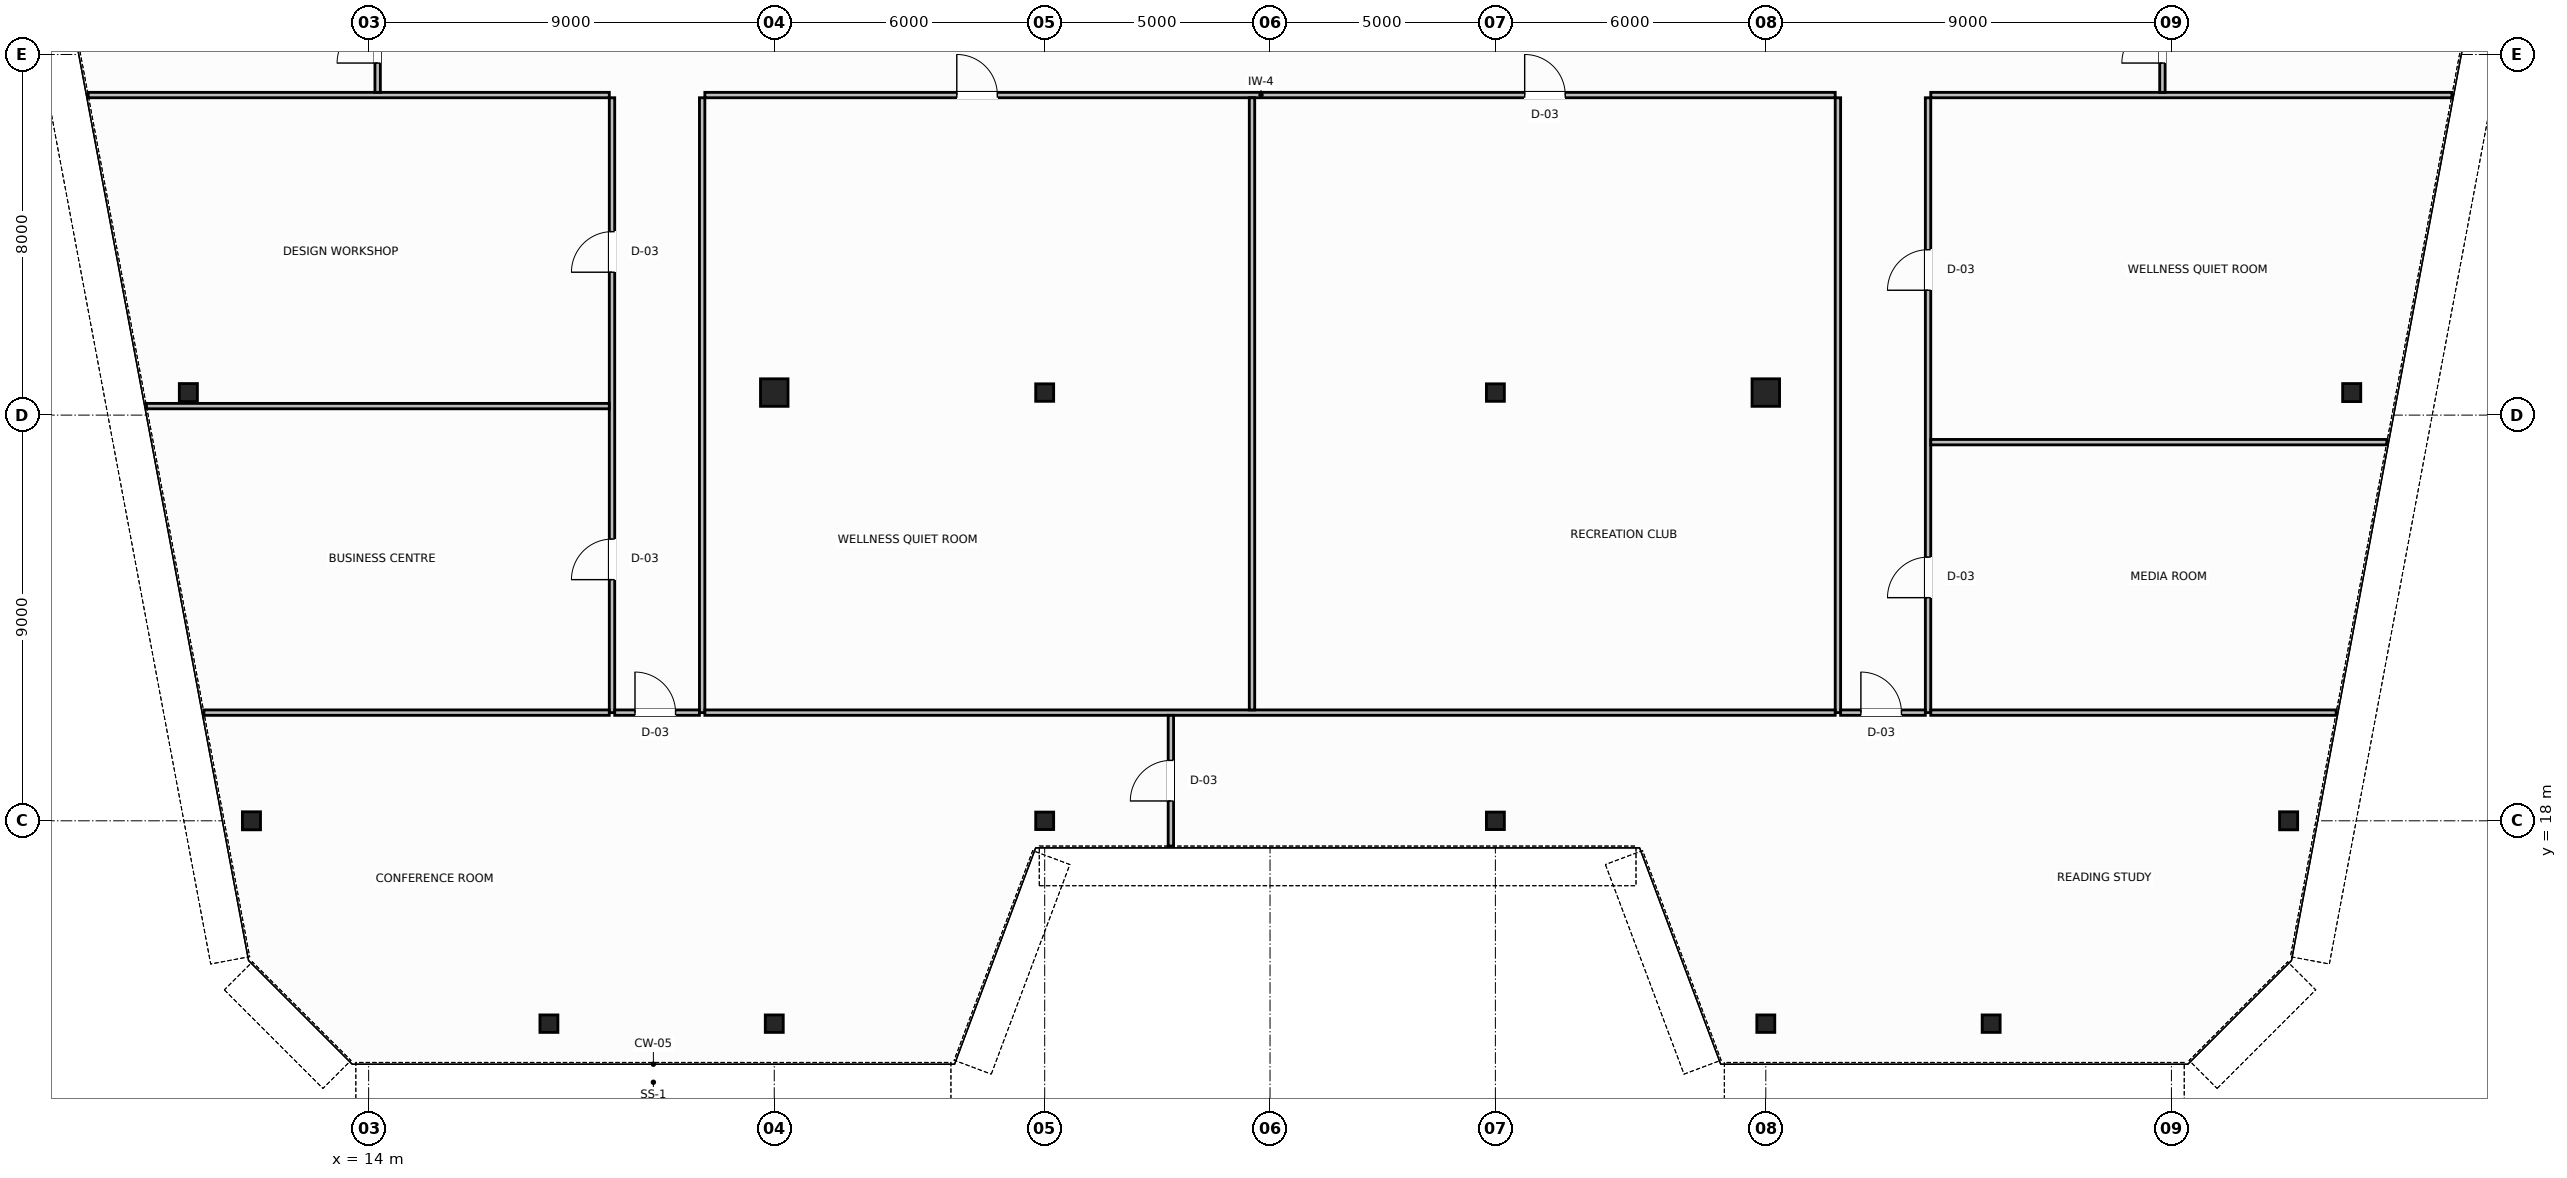
"""IFC4 building model, lengths in metres.
Left out: names, types, materials, properties, quantities, classifications, styles, units other than length and angle.
Written with IfcOpenShell. Run it as: python <this file> out.ifc"""

import sys

from ifc_helpers import new_model, si_unit, direction, frame, frame_2d, origin, origin_2d, place, context, subcontext, project, spatial, rectangle, hollow_circle, i_section, extrude, source, transform, mapped, element, fill, save


model = new_model("IFC4")
c1 = context("Model", 3, precision=1e-05, world=origin(), true_north=direction((0.0, 1.0)))
c2 = subcontext(c1, "Body", "Model", "MODEL_VIEW")
j1 = project(units=[si_unit("LENGTHUNIT", "METRE"), si_unit("PLANEANGLEUNIT", "RADIAN")], contexts=[c1])
p1 = place(None, origin())
s1 = spatial("IfcSite", under=j1, at=p1, CompositionType="ELEMENT")
p2 = place(p1, origin())
s2 = spatial("IfcBuilding", under=s1, at=p2, CompositionType="ELEMENT")
p3 = place(p2, frame((0.0, 0.0, 284.0)))
s3 = spatial("IfcBuildingStorey", under=s2, at=p3, CompositionType="ELEMENT", Elevation=284.0)
m1 = source(origin(), c2, "Body", "SweptSolid", [
    extrude(i_section(OverallWidth=0.401, OverallDepth=0.399, WebThickness=0.025, FlangeThickness=0.035, FilletRadius=0.015, at=origin_2d()), origin(), (0.0, 0.0, 1.0), 3.8),
])
for number, where, z_axis, x_axis in (
    (1, (10.0, 27.5, 0.0), (0.0, 0.0, 1.0), (1.0, 0.0, 0.0)),
    (2, (11.4, 18.0, 0.0), (0.0, 0.0, 1.0), (1.0, 0.0, 0.0)),
    (3, (58.0, 27.5, 0.0), (0.0, 0.0, 1.0), (1.0, 0.0, 0.0)),
    (4, (56.6, 18.0, 0.0), (0.0, 0.0, 1.0), (1.0, 0.0, 0.0)),
):
    element("IfcColumn", number, at=place(p3, frame(where, z_axis=z_axis, x_axis=x_axis)), inside=s3, PredefinedType="COLUMN", context=c2, shape_type="MappedRepresentation", body=[
        mapped(m1, transform((0.0, 0.0, 0.0), scale=1.0)),
    ])
m2 = source(origin(), c2, "Body", "SweptSolid", [
    extrude(hollow_circle(Radius=0.305, WallThickness=0.03, at=origin_2d()), origin(), (0.0, 0.0, 1.0), 3.8),
])
p4 = place(p3, frame((23.0, 27.5, 0.0), z_axis=(0.0, 0.0, 1.0), x_axis=(1.0, 0.0, 0.0)))
e5 = element("IfcColumn", 5, at=p4, inside=s3, PredefinedType="COLUMN", context=c2, shape_type="MappedRepresentation", body=[
    mapped(m2, transform((0.0, 0.0, 0.0), scale=1.0)),
])
m3 = source(origin(), c2, "Body", "SweptSolid", [
    extrude(i_section(OverallWidth=0.398, OverallDepth=0.387, WebThickness=0.021, FlangeThickness=0.029, FilletRadius=0.015, at=origin_2d()), origin(), (0.0, 0.0, 1.0), 3.8),
])
for number, where, z_axis, x_axis in (
    (6, (29.0, 27.5, 0.0), (0.0, 0.0, 1.0), (1.0, 0.0, 0.0)),
    (7, (39.0, 27.5, 0.0), (0.0, 0.0, 1.0), (1.0, 0.0, 0.0)),
):
    element("IfcColumn", number, at=place(p3, frame(where, z_axis=z_axis, x_axis=x_axis)), inside=s3, PredefinedType="COLUMN", context=c2, shape_type="MappedRepresentation", body=[
        mapped(m3, transform((0.0, 0.0, 0.0), scale=1.0)),
    ])
p5 = place(p3, frame((45.0, 27.5, 0.0), z_axis=(0.0, 0.0, 1.0), x_axis=(1.0, 0.0, 0.0)))
e8 = element("IfcColumn", 8, at=p5, inside=s3, PredefinedType="COLUMN", context=c2, shape_type="MappedRepresentation", body=[
    mapped(m2, transform((0.0, 0.0, 0.0), scale=1.0)),
])
for number, where, z_axis, x_axis in (
    (9, (18.0, 13.5, 0.0), (0.0, 0.0, 1.0), (1.0, 0.0, 0.0)),
    (10, (23.0, 13.5, 0.0), (0.0, 0.0, 1.0), (1.0, 0.0, 0.0)),
    (11, (29.0, 18.0, 0.0), (0.0, 0.0, 1.0), (1.0, 0.0, 0.0)),
    (12, (39.0, 18.0, 0.0), (0.0, 0.0, 1.0), (1.0, 0.0, 0.0)),
    (13, (45.0, 13.5, 0.0), (0.0, 0.0, 1.0), (1.0, 0.0, 0.0)),
    (14, (50.0, 13.5, 0.0), (0.0, 0.0, 1.0), (1.0, 0.0, 0.0)),
):
    element("IfcColumn", number, at=place(p3, frame(where, z_axis=z_axis, x_axis=x_axis)), inside=s3, PredefinedType="COLUMN", context=c2, shape_type="MappedRepresentation", body=[
        mapped(m3, transform((0.0, 0.0, 0.0), scale=1.0)),
    ])
p6 = place(p3, frame((21.46, 34.1, 0.0), z_axis=(0.0, 0.0, 1.0), x_axis=(1.0, 0.0, 0.0)))
e15 = element("IfcWall", 15, at=p6, inside=s3, PredefinedType="PARTITIONING", context=c2, shape_type="SweptSolid", body=[
    extrude(rectangle(XDim=25.08, YDim=0.12, at=frame_2d((12.54, 0.0))), origin(), (0.0, 0.0, 1.0), 3.58),
])
p7 = place(p6, frame((5.59, 0.0, 0.0)))
e16 = element("IfcOpeningElement", 16, at=p7, cuts=e15, PredefinedType="OPENING", context=c2, shape_type="SweptSolid", body=[
    extrude(rectangle(XDim=0.9, YDim=2.15, at=frame_2d((0.45, 1.075))), frame((0.0, 0.07, 0.0), z_axis=(0.0, -1.0, 0.0), x_axis=(1.0, 0.0, 0.0)), (0.0, 0.0, 1.0), 0.14),
])
p8 = place(p6, frame((18.19, 0.0, 0.0)))
e17 = element("IfcOpeningElement", 17, at=p8, cuts=e15, PredefinedType="OPENING", context=c2, shape_type="SweptSolid", body=[
    extrude(rectangle(XDim=0.9, YDim=2.15, at=frame_2d((0.45, 1.075))), frame((0.0, 0.07, 0.0), z_axis=(0.0, -1.0, 0.0), x_axis=(1.0, 0.0, 0.0)), (0.0, 0.0, 1.0), 0.14),
])
for number, where, z_axis, x_axis in (
    (18, (7.777, 34.1, 0.0), (0.0, 0.0, 1.0), (1.0, 0.0, 0.0)),
    (19, (48.66, 34.1, 0.0), (0.0, 0.0, 1.0), (1.0, 0.0, 0.0)),
):
    element("IfcWall", number, at=place(p3, frame(where, z_axis=z_axis, x_axis=x_axis)), inside=s3, PredefinedType="PARTITIONING", context=c2, shape_type="SweptSolid", body=[
        extrude(rectangle(XDim=11.563, YDim=0.12, at=frame_2d((5.782, 0.0))), origin(), (0.0, 0.0, 1.0), 3.58),
    ])
p9 = place(p3, frame((14.2, 34.16, 0.0), z_axis=(0.0, 0.0, 1.0), x_axis=(0.0, 1.0, 0.0)))
e20 = element("IfcWall", 20, at=p9, inside=s3, PredefinedType="PARTITIONING", context=c2, shape_type="SweptSolid", body=[
    extrude(rectangle(XDim=2.28, YDim=0.12, at=frame_2d((1.14, 0.0))), origin(), (0.0, 0.0, 1.0), 3.58),
])
p10 = place(p9, frame((0.65, 0.0, 0.0)))
e21 = element("IfcOpeningElement", 21, at=p10, cuts=e20, PredefinedType="OPENING", context=c2, shape_type="SweptSolid", body=[
    extrude(rectangle(XDim=0.9, YDim=2.15, at=frame_2d((0.45, 1.075))), frame((0.0, 0.07, 0.0), z_axis=(0.0, -1.0, 0.0), x_axis=(1.0, 0.0, 0.0)), (0.0, 0.0, 1.0), 0.14),
])
p11 = place(p3, frame((53.8, 34.16, 0.0), z_axis=(0.0, 0.0, 1.0), x_axis=(0.0, 1.0, 0.0)))
e22 = element("IfcWall", 22, at=p11, inside=s3, PredefinedType="PARTITIONING", context=c2, shape_type="SweptSolid", body=[
    extrude(rectangle(XDim=2.28, YDim=0.12, at=frame_2d((1.14, 0.0))), origin(), (0.0, 0.0, 1.0), 3.58),
])
p12 = place(p11, frame((0.65, 0.0, 0.0)))
e23 = element("IfcOpeningElement", 23, at=p12, cuts=e22, PredefinedType="OPENING", context=c2, shape_type="SweptSolid", body=[
    extrude(rectangle(XDim=0.9, YDim=2.15, at=frame_2d((0.45, 1.075))), frame((0.0, 0.07, 0.0), z_axis=(0.0, -1.0, 0.0), x_axis=(1.0, 0.0, 0.0)), (0.0, 0.0, 1.0), 0.14),
])
p13 = place(p3, frame((19.4, 20.4, 0.0), z_axis=(0.0, 0.0, 1.0), x_axis=(0.0, 1.0, 0.0)))
e24 = element("IfcWall", 24, at=p13, inside=s3, PredefinedType="PARTITIONING", context=c2, shape_type="SweptSolid", body=[
    extrude(rectangle(XDim=13.64, YDim=0.12, at=frame_2d((6.82, 0.0))), origin(), (0.0, 0.0, 1.0), 3.58),
])
p14 = place(p13, frame((2.95, 0.0, 0.0)))
e25 = element("IfcOpeningElement", 25, at=p14, cuts=e24, PredefinedType="OPENING", context=c2, shape_type="SweptSolid", body=[
    extrude(rectangle(XDim=0.9, YDim=2.15, at=frame_2d((0.45, 1.075))), frame((0.0, 0.07, 0.0), z_axis=(0.0, -1.0, 0.0), x_axis=(1.0, 0.0, 0.0)), (0.0, 0.0, 1.0), 0.14),
])
p15 = place(p13, frame((9.77, 0.0, 0.0)))
e26 = element("IfcOpeningElement", 26, at=p15, cuts=e24, PredefinedType="OPENING", context=c2, shape_type="SweptSolid", body=[
    extrude(rectangle(XDim=0.9, YDim=2.15, at=frame_2d((0.45, 1.075))), frame((0.0, 0.07, 0.0), z_axis=(0.0, -1.0, 0.0), x_axis=(1.0, 0.0, 0.0)), (0.0, 0.0, 1.0), 0.14),
])
for number, where, z_axis, x_axis in (
    (27, (21.4, 20.4, 0.0), (0.0, 0.0, 1.0), (0.0, 1.0, 0.0)),
    (28, (46.6, 20.4, 0.0), (0.0, 0.0, 1.0), (0.0, 1.0, 0.0)),
):
    element("IfcWall", number, at=place(p3, frame(where, z_axis=z_axis, x_axis=x_axis)), inside=s3, PredefinedType="PARTITIONING", context=c2, shape_type="SweptSolid", body=[
        extrude(rectangle(XDim=13.64, YDim=0.12, at=frame_2d((6.82, 0.0))), origin(), (0.0, 0.0, 1.0), 3.58),
    ])
p16 = place(p3, frame((48.6, 20.4, 0.0), z_axis=(0.0, 0.0, 1.0), x_axis=(0.0, 1.0, 0.0)))
e29 = element("IfcWall", 29, at=p16, inside=s3, PredefinedType="PARTITIONING", context=c2, shape_type="SweptSolid", body=[
    extrude(rectangle(XDim=13.64, YDim=0.12, at=frame_2d((6.82, 0.0))), origin(), (0.0, 0.0, 1.0), 3.58),
])
p17 = place(p16, frame((2.55, 0.0, 0.0)))
e30 = element("IfcOpeningElement", 30, at=p17, cuts=e29, PredefinedType="OPENING", context=c2, shape_type="SweptSolid", body=[
    extrude(rectangle(XDim=0.9, YDim=2.15, at=frame_2d((0.45, 1.075))), frame((0.0, 0.07, 0.0), z_axis=(0.0, -1.0, 0.0), x_axis=(1.0, 0.0, 0.0)), (0.0, 0.0, 1.0), 0.14),
])
p18 = place(p16, frame((9.37, 0.0, 0.0)))
e31 = element("IfcOpeningElement", 31, at=p18, cuts=e29, PredefinedType="OPENING", context=c2, shape_type="SweptSolid", body=[
    extrude(rectangle(XDim=0.9, YDim=2.15, at=frame_2d((0.45, 1.075))), frame((0.0, 0.07, 0.0), z_axis=(0.0, -1.0, 0.0), x_axis=(1.0, 0.0, 0.0)), (0.0, 0.0, 1.0), 0.14),
])
p19 = place(p3, frame((19.46, 20.4, 0.0), z_axis=(0.0, 0.0, 1.0), x_axis=(1.0, 0.0, 0.0)))
e32 = element("IfcWall", 32, at=p19, inside=s3, PredefinedType="PARTITIONING", context=c2, shape_type="SweptSolid", body=[
    extrude(rectangle(XDim=1.88, YDim=0.12, at=frame_2d((0.94, 0.0))), origin(), (0.0, 0.0, 1.0), 3.58),
])
p20 = place(p19, frame((0.45, 0.0, 0.0)))
e33 = element("IfcOpeningElement", 33, at=p20, cuts=e32, PredefinedType="OPENING", context=c2, shape_type="SweptSolid", body=[
    extrude(rectangle(XDim=0.9, YDim=2.15, at=frame_2d((0.45, 1.075))), frame((0.0, 0.07, 0.0), z_axis=(0.0, -1.0, 0.0), x_axis=(1.0, 0.0, 0.0)), (0.0, 0.0, 1.0), 0.14),
])
p21 = place(p3, frame((46.66, 20.4, 0.0), z_axis=(0.0, 0.0, 1.0), x_axis=(1.0, 0.0, 0.0)))
e34 = element("IfcWall", 34, at=p21, inside=s3, PredefinedType="PARTITIONING", context=c2, shape_type="SweptSolid", body=[
    extrude(rectangle(XDim=1.88, YDim=0.12, at=frame_2d((0.94, 0.0))), origin(), (0.0, 0.0, 1.0), 3.58),
])
p22 = place(p21, frame((0.45, 0.0, 0.0)))
e35 = element("IfcOpeningElement", 35, at=p22, cuts=e34, PredefinedType="OPENING", context=c2, shape_type="SweptSolid", body=[
    extrude(rectangle(XDim=0.9, YDim=2.15, at=frame_2d((0.45, 1.075))), frame((0.0, 0.07, 0.0), z_axis=(0.0, -1.0, 0.0), x_axis=(1.0, 0.0, 0.0)), (0.0, 0.0, 1.0), 0.14),
])
p23 = place(p3, frame((10.345, 20.4, 0.0), z_axis=(0.0, 0.0, 1.0), x_axis=(1.0, 0.0, 0.0)))
e36 = element("IfcWall", 36, at=p23, inside=s3, PredefinedType="PARTITIONING", context=c2, shape_type="SweptSolid", body=[
    extrude(rectangle(XDim=8.995, YDim=0.12, at=frame_2d((4.498, 0.0))), origin(), (0.0, 0.0, 1.0), 3.58),
])
p24 = place(p3, frame((9.07, 27.2, 0.0), z_axis=(0.0, 0.0, 1.0), x_axis=(1.0, 0.0, 0.0)))
e37 = element("IfcWall", 37, at=p24, inside=s3, PredefinedType="PARTITIONING", context=c2, shape_type="SweptSolid", body=[
    extrude(rectangle(XDim=10.27, YDim=0.12, at=frame_2d((5.135, 0.0))), origin(), (0.0, 0.0, 1.0), 3.58),
])
p25 = place(p3, frame((48.66, 20.4, 0.0), z_axis=(0.0, 0.0, 1.0), x_axis=(1.0, 0.0, 0.0)))
e38 = element("IfcWall", 38, at=p25, inside=s3, PredefinedType="PARTITIONING", context=c2, shape_type="SweptSolid", body=[
    extrude(rectangle(XDim=8.995, YDim=0.12, at=frame_2d((4.498, 0.0))), origin(), (0.0, 0.0, 1.0), 3.58),
])
p26 = place(p3, frame((48.66, 26.4, 0.0), z_axis=(0.0, 0.0, 1.0), x_axis=(1.0, 0.0, 0.0)))
e39 = element("IfcWall", 39, at=p26, inside=s3, PredefinedType="PARTITIONING", context=c2, shape_type="SweptSolid", body=[
    extrude(rectangle(XDim=10.12, YDim=0.12, at=frame_2d((5.06, 0.0))), origin(), (0.0, 0.0, 1.0), 3.58),
])
p27 = place(p3, frame((21.46, 20.4, 0.0), z_axis=(0.0, 0.0, 1.0), x_axis=(1.0, 0.0, 0.0)))
e40 = element("IfcWall", 40, at=p27, inside=s3, PredefinedType="PARTITIONING", context=c2, shape_type="SweptSolid", body=[
    extrude(rectangle(XDim=25.08, YDim=0.12, at=frame_2d((12.54, 0.0))), origin(), (0.0, 0.0, 1.0), 3.58),
])
p28 = place(p3, frame((33.6, 20.46, 0.0), z_axis=(0.0, 0.0, 1.0), x_axis=(0.0, 1.0, 0.0)))
e41 = element("IfcWall", 41, at=p28, inside=s3, PredefinedType="PARTITIONING", context=c2, shape_type="SweptSolid", body=[
    extrude(rectangle(XDim=13.58, YDim=0.12, at=frame_2d((6.79, 0.0))), origin(), (0.0, 0.0, 1.0), 3.58),
])
p29 = place(p3, frame((31.8, 17.44, 0.0), z_axis=(0.0, 0.0, 1.0), x_axis=(0.0, 1.0, 0.0)))
e42 = element("IfcWall", 42, at=p29, inside=s3, PredefinedType="PARTITIONING", context=c2, shape_type="SweptSolid", body=[
    extrude(rectangle(XDim=2.9, YDim=0.12, at=frame_2d((1.45, 0.0))), origin(), (0.0, 0.0, 1.0), 3.58),
])
p30 = place(p29, frame((1.0, 0.0, 0.0)))
e43 = element("IfcOpeningElement", 43, at=p30, cuts=e42, PredefinedType="OPENING", context=c2, shape_type="SweptSolid", body=[
    extrude(rectangle(XDim=0.9, YDim=2.15, at=frame_2d((0.45, 1.075))), frame((0.0, 0.07, 0.0), z_axis=(0.0, -1.0, 0.0), x_axis=(1.0, 0.0, 0.0)), (0.0, 0.0, 1.0), 0.14),
])
m4 = source(origin(), c2, "Body", "SweptSolid", [
    extrude(rectangle(XDim=0.9, YDim=2.15, at=frame_2d((0.45, 1.075))), frame((0.0, 0.025, 0.0), z_axis=(0.0, -1.0, 0.0), x_axis=(1.0, 0.0, 0.0)), (0.0, 0.0, 1.0), 0.05),
])
p31 = place(p10, origin())
e44 = element("IfcDoor", 44, at=p31, inside=s3, OperationType="SINGLE_SWING_LEFT", PredefinedType="DOOR", context=c2, shape_type="MappedRepresentation", body=[
    mapped(m4, transform((0.0, 0.0, 0.0), scale=1.0)),
])
fill(e21, e44)
p32 = place(p12, origin())
e45 = element("IfcDoor", 45, at=p32, inside=s3, OperationType="SINGLE_SWING_RIGHT", PredefinedType="DOOR", context=c2, shape_type="MappedRepresentation", body=[
    mapped(m4, transform((0.0, 0.0, 0.0), scale=1.0)),
])
fill(e23, e45)
p33 = place(p14, origin())
e46 = element("IfcDoor", 46, at=p33, inside=s3, OperationType="SINGLE_SWING_LEFT", PredefinedType="DOOR", context=c2, shape_type="MappedRepresentation", body=[
    mapped(m4, transform((0.0, 0.0, 0.0), scale=1.0)),
])
fill(e25, e46)
p34 = place(p15, origin())
e47 = element("IfcDoor", 47, at=p34, inside=s3, OperationType="SINGLE_SWING_RIGHT", PredefinedType="DOOR", context=c2, shape_type="MappedRepresentation", body=[
    mapped(m4, transform((0.0, 0.0, 0.0), scale=1.0)),
])
fill(e26, e47)
p35 = place(p17, origin())
e48 = element("IfcDoor", 48, at=p35, inside=s3, OperationType="SINGLE_SWING_RIGHT", PredefinedType="DOOR", context=c2, shape_type="MappedRepresentation", body=[
    mapped(m4, transform((0.0, 0.0, 0.0), scale=1.0)),
])
fill(e30, e48)
p36 = place(p18, origin())
e49 = element("IfcDoor", 49, at=p36, inside=s3, OperationType="SINGLE_SWING_LEFT", PredefinedType="DOOR", context=c2, shape_type="MappedRepresentation", body=[
    mapped(m4, transform((0.0, 0.0, 0.0), scale=1.0)),
])
fill(e31, e49)
p37 = place(p7, origin())
e50 = element("IfcDoor", 50, at=p37, inside=s3, OperationType="SINGLE_SWING_LEFT", PredefinedType="DOOR", context=c2, shape_type="MappedRepresentation", body=[
    mapped(m4, transform((0.0, 0.0, 0.0), scale=1.0)),
])
fill(e16, e50)
p38 = place(p8, origin())
e51 = element("IfcDoor", 51, at=p38, inside=s3, OperationType="SINGLE_SWING_RIGHT", PredefinedType="DOOR", context=c2, shape_type="MappedRepresentation", body=[
    mapped(m4, transform((0.0, 0.0, 0.0), scale=1.0)),
])
fill(e17, e51)
p39 = place(p20, origin())
e52 = element("IfcDoor", 52, at=p39, inside=s3, OperationType="SINGLE_SWING_LEFT", PredefinedType="DOOR", context=c2, shape_type="MappedRepresentation", body=[
    mapped(m4, transform((0.0, 0.0, 0.0), scale=1.0)),
])
fill(e33, e52)
p40 = place(p30, origin())
e53 = element("IfcDoor", 53, at=p40, inside=s3, OperationType="SINGLE_SWING_RIGHT", PredefinedType="DOOR", context=c2, shape_type="MappedRepresentation", body=[
    mapped(m4, transform((0.0, 0.0, 0.0), scale=1.0)),
])
fill(e43, e53)
p41 = place(p22, origin())
e54 = element("IfcDoor", 54, at=p41, inside=s3, OperationType="SINGLE_SWING_RIGHT", PredefinedType="DOOR", context=c2, shape_type="MappedRepresentation", body=[
    mapped(m4, transform((0.0, 0.0, 0.0), scale=1.0)),
])
fill(e35, e54)
save(model, sys.argv[1])
